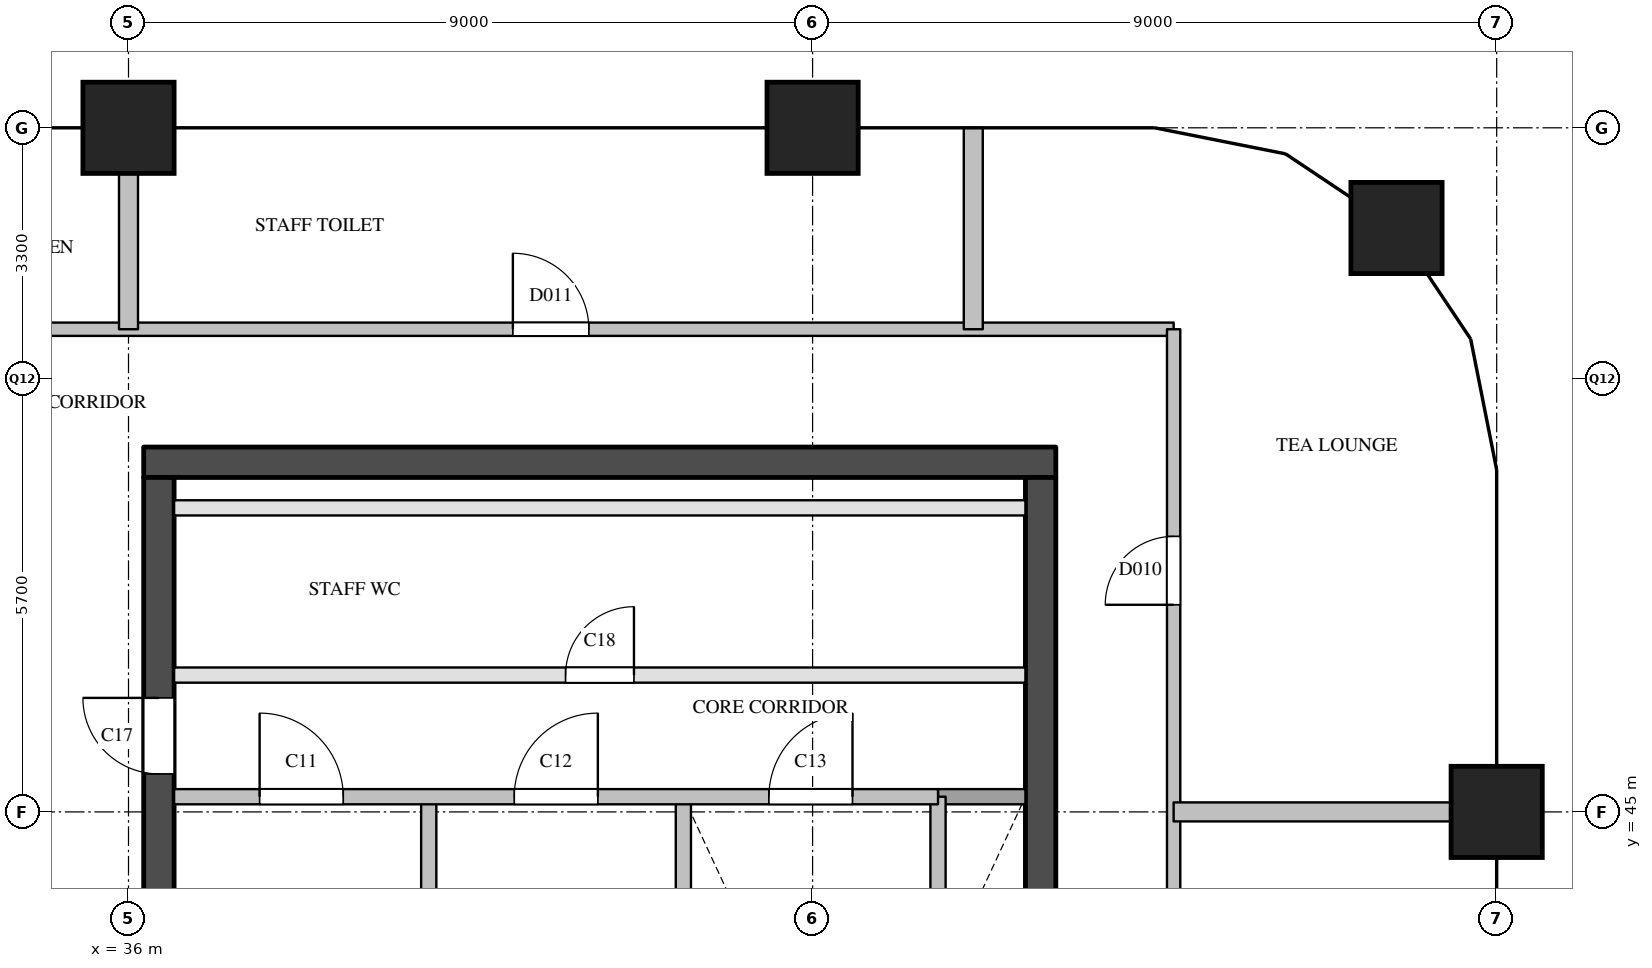
"""IFC4 building model, lengths in metres.
Left out: names, types, materials, properties, quantities, classifications, styles, units other than length and angle.
Written with IfcOpenShell. Run it as: python <this file> out.ifc"""

import sys

from ifc_helpers import new_model, si_unit, direction, frame, frame_2d, origin, origin_2d, place, context, subcontext, project, spatial, rectangle, extrude, element, fill, save


model = new_model("IFC4")
c1 = context("Model", 3, precision=1e-05, world=origin(), true_north=direction((0.0, 1.0)))
c2 = subcontext(c1, "Body", "Model", "MODEL_VIEW")
j1 = project(units=[si_unit("LENGTHUNIT", "METRE"), si_unit("PLANEANGLEUNIT", "RADIAN")], contexts=[c1])
p1 = place(None, origin())
s1 = spatial("IfcSite", under=j1, at=p1, CompositionType="ELEMENT")
p2 = place(p1, origin())
s2 = spatial("IfcBuilding", under=s1, at=p2, CompositionType="ELEMENT")
p3 = place(p2, frame((0.0, 0.0, 273.5)))
s3 = spatial("IfcBuildingStorey", under=s2, at=p3, CompositionType="ELEMENT", Elevation=273.5)
for number, where, z_axis, x_axis in (
    (1, (36.0, 54.0, 0.0), (0.0, 0.0, 1.0), (1.0, 0.0, 0.0)),
    (2, (45.0, 54.0, 0.0), (0.0, 0.0, 1.0), (1.0, 0.0, 0.0)),
    (3, (54.0, 45.0, 0.0), (0.0, 0.0, 1.0), (1.0, 0.0, 0.0)),
    (4, (52.682, 52.682, 0.0), (0.0, 0.0, 1.0), (1.0, 0.0, 0.0)),
):
    element("IfcColumn", number, at=place(p3, frame(where, z_axis=z_axis, x_axis=x_axis)), inside=s3, PredefinedType="COLUMN", context=c2, shape_type="SweptSolid", body=[
        extrude(rectangle(XDim=1.2, YDim=1.2, at=origin_2d()), origin(), (0.0, 0.0, 1.0), 3.9),
    ])
p4 = place(p3, frame((36.2, 49.6, 0.0), z_axis=(0.0, 0.0, 1.0), x_axis=(1.0, 0.0, 0.0)))
e5 = element("IfcWall", 5, at=p4, inside=s3, PredefinedType="SHEAR", context=c2, shape_type="SweptSolid", body=[
    extrude(rectangle(XDim=12.0, YDim=0.4, at=frame_2d((6.0, 0.0))), origin(), (0.0, 0.0, 1.0), 3.6),
])
p5 = place(p3, frame((36.4, 29.1, 0.0), z_axis=(0.0, 0.0, 1.0), x_axis=(0.0, 1.0, 0.0)))
e6 = element("IfcWall", 6, at=p5, inside=s3, PredefinedType="SHEAR", context=c2, shape_type="SweptSolid", body=[
    extrude(rectangle(XDim=20.3, YDim=0.4, at=frame_2d((10.15, 0.0))), origin(), (0.0, 0.0, 1.0), 3.6),
])
p6 = place(p5, frame((3.6, 0.0, 0.0)))
e7 = element("IfcOpeningElement", 7, at=p6, cuts=e6, PredefinedType="OPENING", context=c2, shape_type="SweptSolid", body=[
    extrude(rectangle(XDim=1.8, YDim=2.1, at=frame_2d((0.9, 1.05))), frame((0.0, 0.21, 0.0), z_axis=(0.0, -1.0, 0.0), x_axis=(1.0, 0.0, 0.0)), (0.0, 0.0, 1.0), 0.42),
])
p7 = place(p5, frame((16.4, 0.0, 0.0)))
e8 = element("IfcOpeningElement", 8, at=p7, cuts=e6, PredefinedType="OPENING", context=c2, shape_type="SweptSolid", body=[
    extrude(rectangle(XDim=1.0, YDim=2.1, at=frame_2d((0.5, 1.05))), frame((0.0, 0.21, 0.0), z_axis=(0.0, -1.0, 0.0), x_axis=(1.0, 0.0, 0.0)), (0.0, 0.0, 1.0), 0.42),
])
p8 = place(p3, frame((48.0, 29.1, 0.0), z_axis=(0.0, 0.0, 1.0), x_axis=(0.0, 1.0, 0.0)))
e9 = element("IfcWall", 9, at=p8, inside=s3, PredefinedType="SHEAR", context=c2, shape_type="SweptSolid", body=[
    extrude(rectangle(XDim=20.3, YDim=0.4, at=frame_2d((10.15, 0.0))), origin(), (0.0, 0.0, 1.0), 3.6),
])
p9 = place(p8, frame((12.5, 0.0, 0.0)))
e10 = element("IfcOpeningElement", 10, at=p9, cuts=e9, PredefinedType="OPENING", context=c2, shape_type="SweptSolid", body=[
    extrude(rectangle(XDim=0.7, YDim=2.1, at=frame_2d((0.35, 1.05))), frame((0.0, 0.21, 0.0), z_axis=(0.0, -1.0, 0.0), x_axis=(1.0, 0.0, 0.0)), (0.0, 0.0, 1.0), 0.42),
])
p10 = place(p8, frame((3.9, 0.0, 0.0)))
e11 = element("IfcOpeningElement", 11, at=p10, cuts=e9, PredefinedType="OPENING", context=c2, shape_type="SweptSolid", body=[
    extrude(rectangle(XDim=1.8, YDim=2.1, at=frame_2d((0.9, 1.05))), frame((0.0, 0.21, 0.0), z_axis=(0.0, -1.0, 0.0), x_axis=(1.0, 0.0, 0.0)), (0.0, 0.0, 1.0), 0.42),
])
for number, where, z_axis, x_axis in (
    (12, (39.95, 40.78, 0.0), (0.0, 0.0, 1.0), (0.0, 1.0, 0.0)),
    (13, (43.3, 40.78, 0.0), (0.0, 0.0, 1.0), (0.0, 1.0, 0.0)),
    (14, (46.65, 40.78, 0.0), (0.0, 0.0, 1.0), (0.0, 1.0, 0.0)),
):
    element("IfcWall", number, at=place(p3, frame(where, z_axis=z_axis, x_axis=x_axis)), inside=s3, PredefinedType="SOLIDWALL", context=c2, shape_type="SweptSolid", body=[
        extrude(rectangle(XDim=4.42, YDim=0.2, at=frame_2d((2.21, 0.0))), origin(), (0.0, 0.0, 1.0), 3.6),
    ])
p11 = place(p3, frame((46.65, 45.2, 0.0), z_axis=(0.0, 0.0, 1.0), x_axis=(1.0, 0.0, 0.0)))
e15 = element("IfcWall", 15, at=p11, inside=s3, PredefinedType="SOLIDWALL", context=c2, shape_type="SweptSolid", body=[
    extrude(rectangle(XDim=1.15, YDim=0.2, at=frame_2d((0.575, 0.0))), origin(), (0.0, 0.0, 1.0), 3.6),
])
p12 = place(p3, frame((36.6, 45.2, 0.0), z_axis=(0.0, 0.0, 1.0), x_axis=(1.0, 0.0, 0.0)))
e16 = element("IfcWall", 16, at=p12, inside=s3, PredefinedType="SOLIDWALL", context=c2, shape_type="SweptSolid", body=[
    extrude(rectangle(XDim=10.05, YDim=0.2, at=frame_2d((5.025, 0.0))), origin(), (0.0, 0.0, 1.0), 3.6),
])
p13 = place(p12, frame((1.125, 0.0, 0.0)))
e17 = element("IfcOpeningElement", 17, at=p13, cuts=e16, PredefinedType="OPENING", context=c2, shape_type="SweptSolid", body=[
    extrude(rectangle(XDim=1.1, YDim=2.1, at=frame_2d((0.55, 1.05))), frame((0.0, 0.11, 0.0), z_axis=(0.0, -1.0, 0.0), x_axis=(1.0, 0.0, 0.0)), (0.0, 0.0, 1.0), 0.22),
])
p14 = place(p12, frame((4.475, 0.0, 0.0)))
e18 = element("IfcOpeningElement", 18, at=p14, cuts=e16, PredefinedType="OPENING", context=c2, shape_type="SweptSolid", body=[
    extrude(rectangle(XDim=1.1, YDim=2.1, at=frame_2d((0.55, 1.05))), frame((0.0, 0.11, 0.0), z_axis=(0.0, -1.0, 0.0), x_axis=(1.0, 0.0, 0.0)), (0.0, 0.0, 1.0), 0.22),
])
p15 = place(p12, frame((7.825, 0.0, 0.0)))
e19 = element("IfcOpeningElement", 19, at=p15, cuts=e16, PredefinedType="OPENING", context=c2, shape_type="SweptSolid", body=[
    extrude(rectangle(XDim=1.1, YDim=2.1, at=frame_2d((0.55, 1.05))), frame((0.0, 0.11, 0.0), z_axis=(0.0, -1.0, 0.0), x_axis=(1.0, 0.0, 0.0)), (0.0, 0.0, 1.0), 0.22),
])
p16 = place(p3, frame((36.6, 46.8, 0.0), z_axis=(0.0, 0.0, 1.0), x_axis=(1.0, 0.0, 0.0)))
e20 = element("IfcWall", 20, at=p16, inside=s3, PredefinedType="PARTITIONING", context=c2, shape_type="SweptSolid", body=[
    extrude(rectangle(XDim=11.2, YDim=0.2, at=frame_2d((5.6, 0.0))), origin(), (0.0, 0.0, 1.0), 3.6),
])
p17 = place(p16, frame((5.15, 0.0, 0.0)))
e21 = element("IfcOpeningElement", 21, at=p17, cuts=e20, PredefinedType="OPENING", context=c2, shape_type="SweptSolid", body=[
    extrude(rectangle(XDim=0.9, YDim=2.1, at=frame_2d((0.45, 1.05))), frame((0.0, 0.11, 0.0), z_axis=(0.0, -1.0, 0.0), x_axis=(1.0, 0.0, 0.0)), (0.0, 0.0, 1.0), 0.22),
])
p18 = place(p3, frame((36.6, 49.0, 0.0), z_axis=(0.0, 0.0, 1.0), x_axis=(1.0, 0.0, 0.0)))
e22 = element("IfcWall", 22, at=p18, inside=s3, PredefinedType="PARTITIONING", context=c2, shape_type="SweptSolid", body=[
    extrude(rectangle(XDim=11.2, YDim=0.2, at=frame_2d((5.6, 0.0))), origin(), (0.0, 0.0, 1.0), 3.6),
])
p19 = place(p3, frame((34.65, 51.35, 0.0), z_axis=(0.0, 0.0, 1.0), x_axis=(1.0, 0.0, 0.0)))
e23 = element("IfcWall", 23, at=p19, inside=s3, PredefinedType="PARTITIONING", context=c2, shape_type="SweptSolid", body=[
    extrude(rectangle(XDim=15.1, YDim=0.175, at=frame_2d((7.55, 0.0))), origin(), (0.0, 0.0, 1.0), 3.6),
])
p20 = place(p19, frame((6.407, 0.0, 0.0)))
e24 = element("IfcOpeningElement", 24, at=p20, cuts=e23, PredefinedType="OPENING", context=c2, shape_type="SweptSolid", body=[
    extrude(rectangle(XDim=1.0, YDim=2.1, at=frame_2d((0.5, 1.05))), frame((0.0, 0.097, 0.0), z_axis=(0.0, -1.0, 0.0), x_axis=(1.0, 0.0, 0.0)), (0.0, 0.0, 1.0), 0.195),
])
p21 = place(p3, frame((49.75, 28.5, 0.0), z_axis=(0.0, 0.0, 1.0), x_axis=(0.0, 1.0, 0.0)))
e25 = element("IfcWall", 25, at=p21, inside=s3, PredefinedType="PARTITIONING", context=c2, shape_type="SweptSolid", body=[
    extrude(rectangle(XDim=22.85, YDim=0.175, at=frame_2d((11.425, 0.0))), origin(), (0.0, 0.0, 1.0), 3.6),
])
p22 = place(p21, frame((7.8, 0.0, 0.0)))
e26 = element("IfcOpeningElement", 26, at=p22, cuts=e25, PredefinedType="OPENING", context=c2, shape_type="SweptSolid", body=[
    extrude(rectangle(XDim=0.9, YDim=2.1, at=frame_2d((0.45, 1.05))), frame((0.0, 0.097, 0.0), z_axis=(0.0, -1.0, 0.0), x_axis=(1.0, 0.0, 0.0)), (0.0, 0.0, 1.0), 0.195),
])
p23 = place(p21, frame((19.225, 0.0, 0.0)))
e27 = element("IfcOpeningElement", 27, at=p23, cuts=e25, PredefinedType="OPENING", context=c2, shape_type="SweptSolid", body=[
    extrude(rectangle(XDim=0.9, YDim=2.1, at=frame_2d((0.45, 1.05))), frame((0.0, 0.097, 0.0), z_axis=(0.0, -1.0, 0.0), x_axis=(1.0, 0.0, 0.0)), (0.0, 0.0, 1.0), 0.195),
])
p24 = place(p3, frame((49.75, 45.0, 0.0), z_axis=(0.0, 0.0, 1.0), x_axis=(1.0, 0.0, 0.0)))
e28 = element("IfcWall", 28, at=p24, inside=s3, PredefinedType="PARTITIONING", context=c2, shape_type="SweptSolid", body=[
    extrude(rectangle(XDim=4.25, YDim=0.25, at=frame_2d((2.125, 0.0))), origin(), (0.0, 0.0, 1.0), 3.6),
])
p25 = place(p3, frame((36.0, 51.35, 0.0), z_axis=(0.0, 0.0, 1.0), x_axis=(0.0, 1.0, 0.0)))
e29 = element("IfcWall", 29, at=p25, inside=s3, PredefinedType="PARTITIONING", context=c2, shape_type="SweptSolid", body=[
    extrude(rectangle(XDim=2.65, YDim=0.25, at=frame_2d((1.325, 0.0))), origin(), (0.0, 0.0, 1.0), 3.6),
])
p26 = place(p3, frame((47.114, 51.35, 0.0), z_axis=(0.0, 0.0, 1.0), x_axis=(0.0, 1.0, 0.0)))
e30 = element("IfcWall", 30, at=p26, inside=s3, PredefinedType="PARTITIONING", context=c2, shape_type="SweptSolid", body=[
    extrude(rectangle(XDim=2.65, YDim=0.25, at=frame_2d((1.325, 0.0))), origin(), (0.0, 0.0, 1.0), 2.6),
])
p27 = place(p13, origin())
e31 = element("IfcDoor", 31, at=p27, inside=s3, OperationType="SINGLE_SWING_LEFT", PredefinedType="DOOR", context=c2, shape_type="SweptSolid", body=[
    extrude(rectangle(XDim=1.1, YDim=2.1, at=frame_2d((0.55, 1.05))), frame((0.0, 0.025, 0.0), z_axis=(0.0, -1.0, 0.0), x_axis=(1.0, 0.0, 0.0)), (0.0, 0.0, 1.0), 0.05),
])
fill(e17, e31)
p28 = place(p14, origin())
e32 = element("IfcDoor", 32, at=p28, inside=s3, OperationType="SINGLE_SWING_RIGHT", PredefinedType="DOOR", context=c2, shape_type="SweptSolid", body=[
    extrude(rectangle(XDim=1.1, YDim=2.1, at=frame_2d((0.55, 1.05))), frame((0.0, 0.025, 0.0), z_axis=(0.0, -1.0, 0.0), x_axis=(1.0, 0.0, 0.0)), (0.0, 0.0, 1.0), 0.05),
])
fill(e18, e32)
p29 = place(p15, origin())
e33 = element("IfcDoor", 33, at=p29, inside=s3, OperationType="SINGLE_SWING_RIGHT", PredefinedType="DOOR", context=c2, shape_type="SweptSolid", body=[
    extrude(rectangle(XDim=1.1, YDim=2.1, at=frame_2d((0.55, 1.05))), frame((0.0, 0.025, 0.0), z_axis=(0.0, -1.0, 0.0), x_axis=(1.0, 0.0, 0.0)), (0.0, 0.0, 1.0), 0.05),
])
fill(e19, e33)
p30 = place(p7, origin())
e34 = element("IfcDoor", 34, at=p30, inside=s3, OperationType="SINGLE_SWING_RIGHT", PredefinedType="DOOR", context=c2, shape_type="SweptSolid", body=[
    extrude(rectangle(XDim=1.0, YDim=2.1, at=frame_2d((0.5, 1.05))), frame((0.0, 0.025, 0.0), z_axis=(0.0, -1.0, 0.0), x_axis=(1.0, 0.0, 0.0)), (0.0, 0.0, 1.0), 0.05),
])
fill(e8, e34)
p31 = place(p17, origin())
e35 = element("IfcDoor", 35, at=p31, inside=s3, OperationType="SINGLE_SWING_RIGHT", PredefinedType="DOOR", context=c2, shape_type="SweptSolid", body=[
    extrude(rectangle(XDim=0.9, YDim=2.1, at=frame_2d((0.45, 1.05))), frame((0.0, 0.025, 0.0), z_axis=(0.0, -1.0, 0.0), x_axis=(1.0, 0.0, 0.0)), (0.0, 0.0, 1.0), 0.05),
])
fill(e21, e35)
p32 = place(p23, origin())
e36 = element("IfcDoor", 36, at=p32, inside=s3, OperationType="SINGLE_SWING_LEFT", PredefinedType="DOOR", context=c2, shape_type="SweptSolid", body=[
    extrude(rectangle(XDim=0.9, YDim=2.1, at=frame_2d((0.45, 1.05))), frame((0.0, 0.025, 0.0), z_axis=(0.0, -1.0, 0.0), x_axis=(1.0, 0.0, 0.0)), (0.0, 0.0, 1.0), 0.05),
])
fill(e27, e36)
p33 = place(p20, origin())
e37 = element("IfcDoor", 37, at=p33, inside=s3, OperationType="SINGLE_SWING_LEFT", PredefinedType="DOOR", context=c2, shape_type="SweptSolid", body=[
    extrude(rectangle(XDim=1.0, YDim=2.1, at=frame_2d((0.5, 1.05))), frame((0.0, 0.025, 0.0), z_axis=(0.0, -1.0, 0.0), x_axis=(1.0, 0.0, 0.0)), (0.0, 0.0, 1.0), 0.05),
])
fill(e24, e37)
save(model, sys.argv[1])
